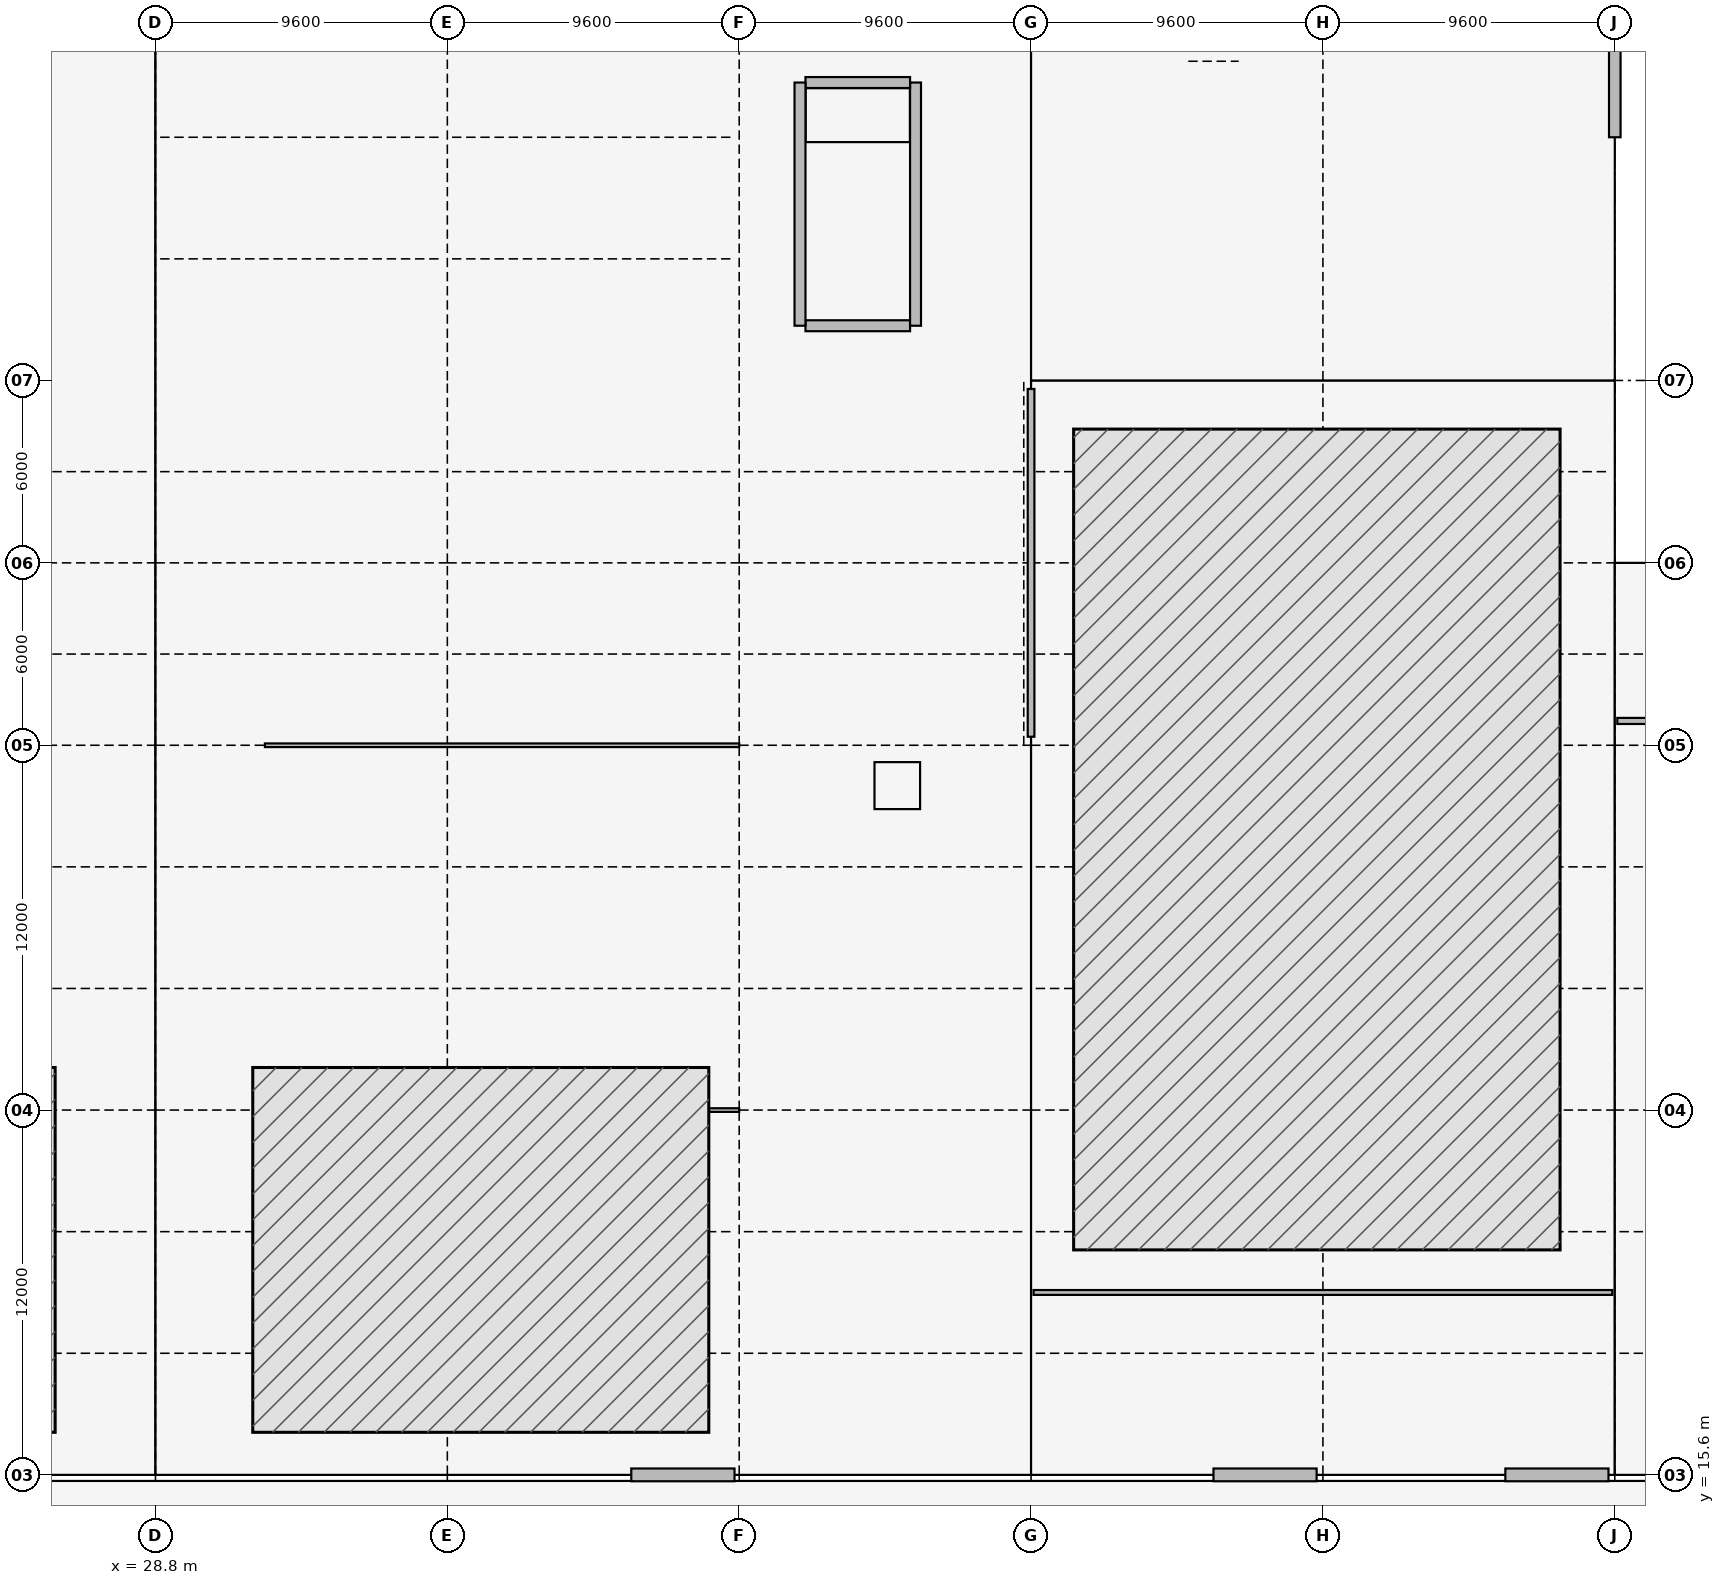
"""IFC4 building model, lengths in metres.
Left out: names, types, materials, properties, quantities, classifications, styles, units other than length and angle.
Written with IfcOpenShell. Run it as: python <this file> out.ifc"""

import sys

from ifc_helpers import new_model, si_unit, direction, frame, frame_2d, origin, origin_2d, place, context, subcontext, project, spatial, rectangle, hollow_circle, i_section, extrude, element, fill, save


model = new_model("IFC4")
c1 = context("Model", 3, precision=1e-05, world=origin(), true_north=direction((0.0, 1.0)))
c2 = subcontext(c1, "Body", "Model", "MODEL_VIEW")
j1 = project(units=[si_unit("LENGTHUNIT", "METRE"), si_unit("PLANEANGLEUNIT", "RADIAN")], contexts=[c1])
p1 = place(None, origin())
s1 = spatial("IfcSite", under=j1, at=p1, CompositionType="ELEMENT")
p2 = place(p1, origin())
s2 = spatial("IfcBuilding", under=s1, at=p2, CompositionType="ELEMENT")
p3 = place(p2, origin())
s3 = spatial("IfcBuildingStorey", under=s2, at=p3, CompositionType="ELEMENT", Elevation=0.0)
for number, where, z_axis, x_axis in (
    (1, (28.8, 15.6, 0.0), (0.0, 0.0, 1.0), (1.0, 0.0, 0.0)),
    (2, (28.8, 27.6, 0.0), (0.0, 0.0, 1.0), (1.0, 0.0, 0.0)),
    (3, (38.4, 15.6, 0.0), (0.0, 0.0, 1.0), (1.0, 0.0, 0.0)),
    (4, (38.4, 27.6, 0.0), (0.0, 0.0, 1.0), (1.0, 0.0, 0.0)),
    (5, (48.0, 15.6, 0.0), (0.0, 0.0, 1.0), (1.0, 0.0, 0.0)),
    (6, (48.0, 27.6, 0.0), (0.0, 0.0, 1.0), (1.0, 0.0, 0.0)),
    (7, (48.0, 39.6, 0.0), (0.0, 0.0, 1.0), (1.0, 0.0, 0.0)),
    (8, (48.0, 45.6, 0.0), (0.0, 0.0, 1.0), (1.0, 0.0, 0.0)),
    (9, (48.0, 51.6, 0.0), (0.0, 0.0, 1.0), (1.0, 0.0, 0.0)),
):
    element("IfcColumn", number, at=place(p3, frame(where, z_axis=z_axis, x_axis=x_axis)), inside=s3, PredefinedType="COLUMN", context=c2, shape_type="SweptSolid", body=[
        extrude(i_section(OverallWidth=0.3, OverallDepth=0.44, WebThickness=0.011, FlangeThickness=0.021, FilletRadius=0.027, at=origin_2d()), origin(), (0.0, 0.0, 1.0), 5.4),
    ])
for number, where, z_axis, x_axis in (
    (10, (57.6, 15.6, 0.0), (0.0, 0.0, 1.0), (1.0, 0.0, 0.0)),
    (11, (57.6, 27.6, 0.0), (0.0, 0.0, 1.0), (1.0, 0.0, 0.0)),
    (12, (57.6, 39.6, 0.0), (0.0, 0.0, 1.0), (1.0, 0.0, 0.0)),
    (13, (57.6, 45.6, 0.0), (0.0, 0.0, 1.0), (1.0, 0.0, 0.0)),
    (14, (57.6, 51.6, 0.0), (0.0, 0.0, 1.0), (1.0, 0.0, 0.0)),
):
    element("IfcColumn", number, at=place(p3, frame(where, z_axis=z_axis, x_axis=x_axis)), inside=s3, PredefinedType="COLUMN", context=c2, shape_type="SweptSolid", body=[
        extrude(i_section(OverallWidth=0.3, OverallDepth=0.65, WebThickness=0.016, FlangeThickness=0.031, FilletRadius=0.027, at=origin_2d()), origin(), (0.0, 0.0, 1.0), 5.4),
    ])
for number, where, z_axis, x_axis in (
    (15, (67.2, 15.6, 0.0), (0.0, 0.0, 1.0), (1.0, 0.0, 0.0)),
    (16, (67.2, 27.6, 0.0), (0.0, 0.0, 1.0), (1.0, 0.0, 0.0)),
    (17, (67.2, 39.6, 0.0), (0.0, 0.0, 1.0), (1.0, 0.0, 0.0)),
    (18, (67.2, 45.6, 0.0), (0.0, 0.0, 1.0), (1.0, 0.0, 0.0)),
    (19, (67.2, 51.6, 0.0), (0.0, 0.0, 1.0), (1.0, 0.0, 0.0)),
    (20, (76.8, 15.6, 0.0), (0.0, 0.0, 1.0), (1.0, 0.0, 0.0)),
    (21, (76.8, 27.6, 0.0), (0.0, 0.0, 1.0), (1.0, 0.0, 0.0)),
    (22, (76.8, 39.6, 0.0), (0.0, 0.0, 1.0), (1.0, 0.0, 0.0)),
    (23, (76.8, 45.6, 0.0), (0.0, 0.0, 1.0), (1.0, 0.0, 0.0)),
    (24, (76.8, 51.6, 0.0), (0.0, 0.0, 1.0), (1.0, 0.0, 0.0)),
):
    element("IfcColumn", number, at=place(p3, frame(where, z_axis=z_axis, x_axis=x_axis)), inside=s3, PredefinedType="COLUMN", context=c2, shape_type="SweptSolid", body=[
        extrude(hollow_circle(Radius=0.203, WallThickness=0.016, at=origin_2d()), origin(), (0.0, 0.0, 1.0), 5.4),
    ])
p4 = place(p3, frame((53.62, 53.4, 0.0), z_axis=(0.0, 0.0, 1.0), x_axis=(-1.0, 0.0, 0.0)))
e25 = element("IfcWall", 25, at=p4, inside=s3, PredefinedType="SHEAR", context=c2, shape_type="SweptSolid", body=[
    extrude(rectangle(XDim=3.44, YDim=0.36, at=frame_2d((1.72, 0.0))), origin(), (0.0, 0.0, 1.0), 5.12),
])
p5 = place(p4, frame((0.95, 0.0, 0.0)))
e26 = element("IfcOpeningElement", 26, at=p5, cuts=e25, PredefinedType="OPENING", context=c2, shape_type="SweptSolid", body=[
    extrude(rectangle(XDim=1.2, YDim=2.2, at=frame_2d((0.6, 1.1))), frame((0.0, 0.19, 0.0), z_axis=(0.0, -1.0, 0.0), x_axis=(1.0, 0.0, 0.0)), (0.0, 0.0, 1.0), 0.38),
])
p6 = place(p3, frame((53.8, 53.4, 0.0), z_axis=(0.0, 0.0, 1.0), x_axis=(0.0, 1.0, 0.0)))
e27 = element("IfcWall", 27, at=p6, inside=s3, PredefinedType="SHEAR", context=c2, shape_type="SweptSolid", body=[
    extrude(rectangle(XDim=8.0, YDim=0.36, at=frame_2d((4.0, 0.0))), origin(), (0.0, 0.0, 1.0), 5.12),
])
p7 = place(p3, frame((53.62, 61.4, 0.0), z_axis=(0.0, 0.0, 1.0), x_axis=(-1.0, 0.0, 0.0)))
e28 = element("IfcWall", 28, at=p7, inside=s3, PredefinedType="SHEAR", context=c2, shape_type="SweptSolid", body=[
    extrude(rectangle(XDim=3.44, YDim=0.36, at=frame_2d((1.72, 0.0))), origin(), (0.0, 0.0, 1.0), 5.12),
])
p8 = place(p3, frame((50.0, 61.4, 0.0), z_axis=(0.0, 0.0, 1.0), x_axis=(0.0, -1.0, 0.0)))
e29 = element("IfcWall", 29, at=p8, inside=s3, PredefinedType="SHEAR", context=c2, shape_type="SweptSolid", body=[
    extrude(rectangle(XDim=8.0, YDim=0.36, at=frame_2d((4.0, 0.0))), origin(), (0.0, 0.0, 1.0), 5.12),
])
p9 = place(p3, frame((47.846, 15.6, 0.0), z_axis=(0.0, 0.0, 1.0), x_axis=(-1.0, 0.0, 0.0)))
e30 = element("IfcWall", 30, at=p9, inside=s3, PredefinedType="STANDARD", context=c2, shape_type="SweptSolid", body=[
    extrude(rectangle(XDim=3.396, YDim=0.42, at=frame_2d((1.698, 0.0))), origin(), (0.0, 0.0, 1.0), 4.7),
])
p10 = place(p9, frame((0.45, 0.0, 0.0)))
e31 = element("IfcOpeningElement", 31, at=p10, cuts=e30, PredefinedType="OPENING", context=c2, shape_type="SweptSolid", body=[
    extrude(rectangle(XDim=2.2, YDim=2.4, at=frame_2d((1.1, 1.2))), frame((0.0, 0.22, 0.0), z_axis=(0.0, -1.0, 0.0), x_axis=(1.0, 0.0, 0.0)), (0.0, 0.0, 1.0), 0.44),
])
p11 = place(p3, frame((57.6, 39.88, 0.0), z_axis=(0.0, 0.0, 1.0), x_axis=(0.0, 1.0, 0.0)))
e32 = element("IfcWall", 32, at=p11, inside=s3, PredefinedType="PARTITIONING", context=c2, shape_type="SweptSolid", body=[
    extrude(rectangle(XDim=11.44, YDim=0.22, at=frame_2d((5.72, 0.0))), origin(), (0.0, 0.0, 1.0), 4.75),
])
p12 = place(p3, frame((66.993, 15.6, 0.0), z_axis=(0.0, 0.0, 1.0), x_axis=(-1.0, 0.0, 0.0)))
e33 = element("IfcWall", 33, at=p12, inside=s3, PredefinedType="STANDARD", context=c2, shape_type="SweptSolid", body=[
    extrude(rectangle(XDim=3.393, YDim=0.42, at=frame_2d((1.696, 0.0))), origin(), (0.0, 0.0, 1.0), 4.7),
])
p13 = place(p12, frame((0.45, 0.0, 0.0)))
e34 = element("IfcOpeningElement", 34, at=p13, cuts=e33, PredefinedType="OPENING", context=c2, shape_type="SweptSolid", body=[
    extrude(rectangle(XDim=2.4, YDim=2.4, at=frame_2d((1.2, 1.2))), frame((0.0, 0.22, 0.0), z_axis=(0.0, -1.0, 0.0), x_axis=(1.0, 0.0, 0.0)), (0.0, 0.0, 1.0), 0.44),
])
p14 = place(p3, frame((76.593, 15.6, 0.0), z_axis=(0.0, 0.0, 1.0), x_axis=(-1.0, 0.0, 0.0)))
e35 = element("IfcWall", 35, at=p14, inside=s3, PredefinedType="STANDARD", context=c2, shape_type="SweptSolid", body=[
    extrude(rectangle(XDim=3.393, YDim=0.42, at=frame_2d((1.696, 0.0))), origin(), (0.0, 0.0, 1.0), 4.635),
])
p15 = place(p14, frame((0.45, 0.0, 0.0)))
e36 = element("IfcOpeningElement", 36, at=p15, cuts=e35, PredefinedType="OPENING", context=c2, shape_type="SweptSolid", body=[
    extrude(rectangle(XDim=2.4, YDim=2.4, at=frame_2d((1.2, 1.2))), frame((0.0, 0.22, 0.0), z_axis=(0.0, -1.0, 0.0), x_axis=(1.0, 0.0, 0.0)), (0.0, 0.0, 1.0), 0.44),
])
p16 = place(p3, frame((76.8, 63.393, 0.0), z_axis=(0.0, 0.0, 1.0), x_axis=(0.0, -1.0, 0.0)))
e37 = element("IfcWall", 37, at=p16, inside=s3, PredefinedType="STANDARD", context=c2, shape_type="SweptSolid", body=[
    extrude(rectangle(XDim=3.793, YDim=0.38, at=frame_2d((1.896, 0.0))), origin(), (0.0, 0.0, 1.0), 4.735),
])
p17 = place(p16, frame((0.7, 0.0, 0.0)))
e38 = element("IfcOpeningElement", 38, at=p17, cuts=e37, PredefinedType="OPENING", context=c2, shape_type="SweptSolid", body=[
    extrude(rectangle(XDim=2.0, YDim=2.3, at=frame_2d((1.0, 1.15))), frame((0.0, 0.2, 0.0), z_axis=(0.0, -1.0, 0.0), x_axis=(1.0, 0.0, 0.0)), (0.0, 0.0, 1.0), 0.4),
])
for number, where, z_axis, x_axis in (
    (39, (32.4, 27.6, 0.0), (0.0, 0.0, 1.0), (1.0, 0.0, 0.0)),
    (40, (32.4, 39.6, 0.0), (0.0, 0.0, 1.0), (1.0, 0.0, 0.0)),
):
    element("IfcWall", number, at=place(p3, frame(where, z_axis=z_axis, x_axis=x_axis)), inside=s3, PredefinedType="PARTITIONING", context=c2, shape_type="SweptSolid", body=[
        extrude(rectangle(XDim=15.6, YDim=0.12, at=frame_2d((7.8, 0.0))), origin(), (0.0, 0.0, 1.0), 2.4),
    ])
p18 = place(p3, frame((57.682, 21.6, 0.0), z_axis=(0.0, 0.0, 1.0), x_axis=(1.0, 0.0, 0.0)))
e41 = element("IfcWall", 41, at=p18, inside=s3, PredefinedType="PARTITIONING", context=c2, shape_type="SweptSolid", body=[
    extrude(rectangle(XDim=19.036, YDim=0.16, at=frame_2d((9.518, 0.0))), origin(), (0.0, 0.0, 1.0), 5.04),
])
p19 = place(p18, frame((3.5, 0.0, 0.0)))
e42 = element("IfcOpeningElement", 42, at=p19, cuts=e41, PredefinedType="OPENING", context=c2, shape_type="SweptSolid", body=[
    extrude(rectangle(XDim=1.7, YDim=2.2, at=frame_2d((0.85, 1.1))), frame((0.0, 0.09, 0.0), z_axis=(0.0, -1.0, 0.0), x_axis=(1.0, 0.0, 0.0)), (0.0, 0.0, 1.0), 0.18),
])
p20 = place(p18, frame((12.5, 0.0, 0.0)))
e43 = element("IfcOpeningElement", 43, at=p20, cuts=e41, PredefinedType="OPENING", context=c2, shape_type="SweptSolid", body=[
    extrude(rectangle(XDim=1.7, YDim=2.2, at=frame_2d((0.85, 1.1))), frame((0.0, 0.09, 0.0), z_axis=(0.0, -1.0, 0.0), x_axis=(1.0, 0.0, 0.0)), (0.0, 0.0, 1.0), 0.18),
])
p21 = place(p3, frame((76.882, 40.4, 0.0), z_axis=(0.0, 0.0, 1.0), x_axis=(1.0, 0.0, 0.0)))
e44 = element("IfcWall", 44, at=p21, inside=s3, PredefinedType="PARTITIONING", context=c2, shape_type="SweptSolid", body=[
    extrude(rectangle(XDim=71.806, YDim=0.2, at=frame_2d((35.903, 0.0))), origin(), (0.0, 0.0, 1.0), 5.04),
])
p22 = place(p21, frame((16.0, 0.0, 0.0)))
e45 = element("IfcOpeningElement", 45, at=p22, cuts=e44, PredefinedType="OPENING", context=c2, shape_type="SweptSolid", body=[
    extrude(rectangle(XDim=1.6, YDim=2.2, at=frame_2d((0.8, 1.1))), frame((0.0, 0.11, 0.0), z_axis=(0.0, -1.0, 0.0), x_axis=(1.0, 0.0, 0.0)), (0.0, 0.0, 1.0), 0.22),
])
p23 = place(p21, frame((40.0, 0.0, 0.0)))
e46 = element("IfcOpeningElement", 46, at=p23, cuts=e44, PredefinedType="OPENING", context=c2, shape_type="SweptSolid", body=[
    extrude(rectangle(XDim=1.6, YDim=2.2, at=frame_2d((0.8, 1.1))), frame((0.0, 0.11, 0.0), z_axis=(0.0, -1.0, 0.0), x_axis=(1.0, 0.0, 0.0)), (0.0, 0.0, 1.0), 0.22),
])
p24 = place(p21, frame((53.0, 0.0, 0.0)))
e47 = element("IfcOpeningElement", 47, at=p24, cuts=e44, PredefinedType="OPENING", context=c2, shape_type="SweptSolid", body=[
    extrude(rectangle(XDim=1.2, YDim=2.2, at=frame_2d((0.6, 1.1))), frame((0.0, 0.11, 0.0), z_axis=(0.0, -1.0, 0.0), x_axis=(1.0, 0.0, 0.0)), (0.0, 0.0, 1.0), 0.22),
])
p25 = place(p21, frame((63.0, 0.0, 0.0)))
e48 = element("IfcOpeningElement", 48, at=p25, cuts=e44, PredefinedType="OPENING", context=c2, shape_type="SweptSolid", body=[
    extrude(rectangle(XDim=1.02, YDim=2.12, at=frame_2d((0.51, 1.06))), frame((0.0, 0.11, 0.0), z_axis=(0.0, -1.0, 0.0), x_axis=(1.0, 0.0, 0.0)), (0.0, 0.0, 1.0), 0.22),
])
p26 = place(p21, frame((67.4, 0.0, 0.0)))
e49 = element("IfcOpeningElement", 49, at=p26, cuts=e44, PredefinedType="OPENING", context=c2, shape_type="SweptSolid", body=[
    extrude(rectangle(XDim=1.0, YDim=2.1, at=frame_2d((0.5, 1.05))), frame((0.0, 0.11, 0.0), z_axis=(0.0, -1.0, 0.0), x_axis=(1.0, 0.0, 0.0)), (0.0, 0.0, 1.0), 0.22),
])
for number, where, z_axis, x_axis in (
    (50, (52.37, 37.5, 0.0), (0.0, 0.0, 1.0), (1.0, 0.0, 0.0)),
    (51, (54.03, 37.5, 0.0), (0.0, 0.0, 1.0), (1.0, 0.0, 0.0)),
):
    element("IfcColumn", number, at=place(p3, frame(where, z_axis=z_axis, x_axis=x_axis)), inside=s3, PredefinedType="COLUMN", context=c2, shape_type="SweptSolid", body=[
        extrude(hollow_circle(Radius=0.136, WallThickness=0.012, at=origin_2d()), origin(), (0.0, 0.0, 1.0), 5.23),
    ])
for number, where, z_axis, x_axis in (
    (52, (52.37, 48.9, 0.0), (0.0, 0.0, 1.0), (1.0, 0.0, 0.0)),
    (53, (54.03, 48.9, 0.0), (0.0, 0.0, 1.0), (1.0, 0.0, 0.0)),
):
    element("IfcColumn", number, at=place(p3, frame(where, z_axis=z_axis, x_axis=x_axis)), inside=s3, PredefinedType="COLUMN", context=c2, shape_type="SweptSolid", body=[
        extrude(hollow_circle(Radius=0.136, WallThickness=0.012, at=origin_2d()), origin(), (0.0, 0.0, 1.0), 5.4),
    ])
p27 = place(p10, origin())
e54 = element("IfcDoor", 54, at=p27, inside=s3, OperationType="DOUBLE_DOOR_SINGLE_SWING", PredefinedType="DOOR", context=c2, shape_type="SweptSolid", body=[
    extrude(rectangle(XDim=2.2, YDim=2.4, at=frame_2d((1.1, 1.2))), frame((0.0, 0.025, 0.0), z_axis=(0.0, -1.0, 0.0), x_axis=(1.0, 0.0, 0.0)), (0.0, 0.0, 1.0), 0.05),
])
fill(e31, e54)
p28 = place(p13, origin())
e55 = element("IfcDoor", 55, at=p28, inside=s3, OperationType="DOUBLE_DOOR_SINGLE_SWING", PredefinedType="DOOR", context=c2, shape_type="SweptSolid", body=[
    extrude(rectangle(XDim=2.4, YDim=2.4, at=frame_2d((1.2, 1.2))), frame((0.0, 0.025, 0.0), z_axis=(0.0, -1.0, 0.0), x_axis=(1.0, 0.0, 0.0)), (0.0, 0.0, 1.0), 0.05),
])
fill(e34, e55)
p29 = place(p15, origin())
e56 = element("IfcDoor", 56, at=p29, inside=s3, OperationType="DOUBLE_DOOR_SINGLE_SWING", PredefinedType="DOOR", context=c2, shape_type="SweptSolid", body=[
    extrude(rectangle(XDim=2.4, YDim=2.4, at=frame_2d((1.2, 1.2))), frame((0.0, 0.025, 0.0), z_axis=(0.0, -1.0, 0.0), x_axis=(1.0, 0.0, 0.0)), (0.0, 0.0, 1.0), 0.05),
])
fill(e36, e56)
p30 = place(p17, origin())
e57 = element("IfcDoor", 57, at=p30, inside=s3, OperationType="DOUBLE_DOOR_SINGLE_SWING", PredefinedType="DOOR", context=c2, shape_type="SweptSolid", body=[
    extrude(rectangle(XDim=2.0, YDim=2.3, at=frame_2d((1.0, 1.15))), frame((0.0, 0.025, 0.0), z_axis=(0.0, -1.0, 0.0), x_axis=(1.0, 0.0, 0.0)), (0.0, 0.0, 1.0), 0.05),
])
fill(e38, e57)
p31 = place(p19, origin())
e58 = element("IfcDoor", 58, at=p31, inside=s3, OperationType="DOUBLE_DOOR_SINGLE_SWING", PredefinedType="DOOR", context=c2, shape_type="SweptSolid", body=[
    extrude(rectangle(XDim=1.7, YDim=2.2, at=frame_2d((0.85, 1.1))), frame((0.0, 0.025, 0.0), z_axis=(0.0, -1.0, 0.0), x_axis=(1.0, 0.0, 0.0)), (0.0, 0.0, 1.0), 0.05),
])
fill(e42, e58)
p32 = place(p20, origin())
e59 = element("IfcDoor", 59, at=p32, inside=s3, OperationType="DOUBLE_DOOR_SINGLE_SWING", PredefinedType="DOOR", context=c2, shape_type="SweptSolid", body=[
    extrude(rectangle(XDim=1.7, YDim=2.2, at=frame_2d((0.85, 1.1))), frame((0.0, 0.025, 0.0), z_axis=(0.0, -1.0, 0.0), x_axis=(1.0, 0.0, 0.0)), (0.0, 0.0, 1.0), 0.05),
])
fill(e43, e59)
p33 = place(p5, origin())
e60 = element("IfcDoor", 60, at=p33, inside=s3, OperationType="SINGLE_SWING_LEFT", PredefinedType="DOOR", context=c2, shape_type="SweptSolid", body=[
    extrude(rectangle(XDim=1.2, YDim=2.2, at=frame_2d((0.6, 1.1))), frame((0.0, 0.025, 0.0), z_axis=(0.0, -1.0, 0.0), x_axis=(1.0, 0.0, 0.0)), (0.0, 0.0, 1.0), 0.05),
])
fill(e26, e60)
save(model, sys.argv[1])
